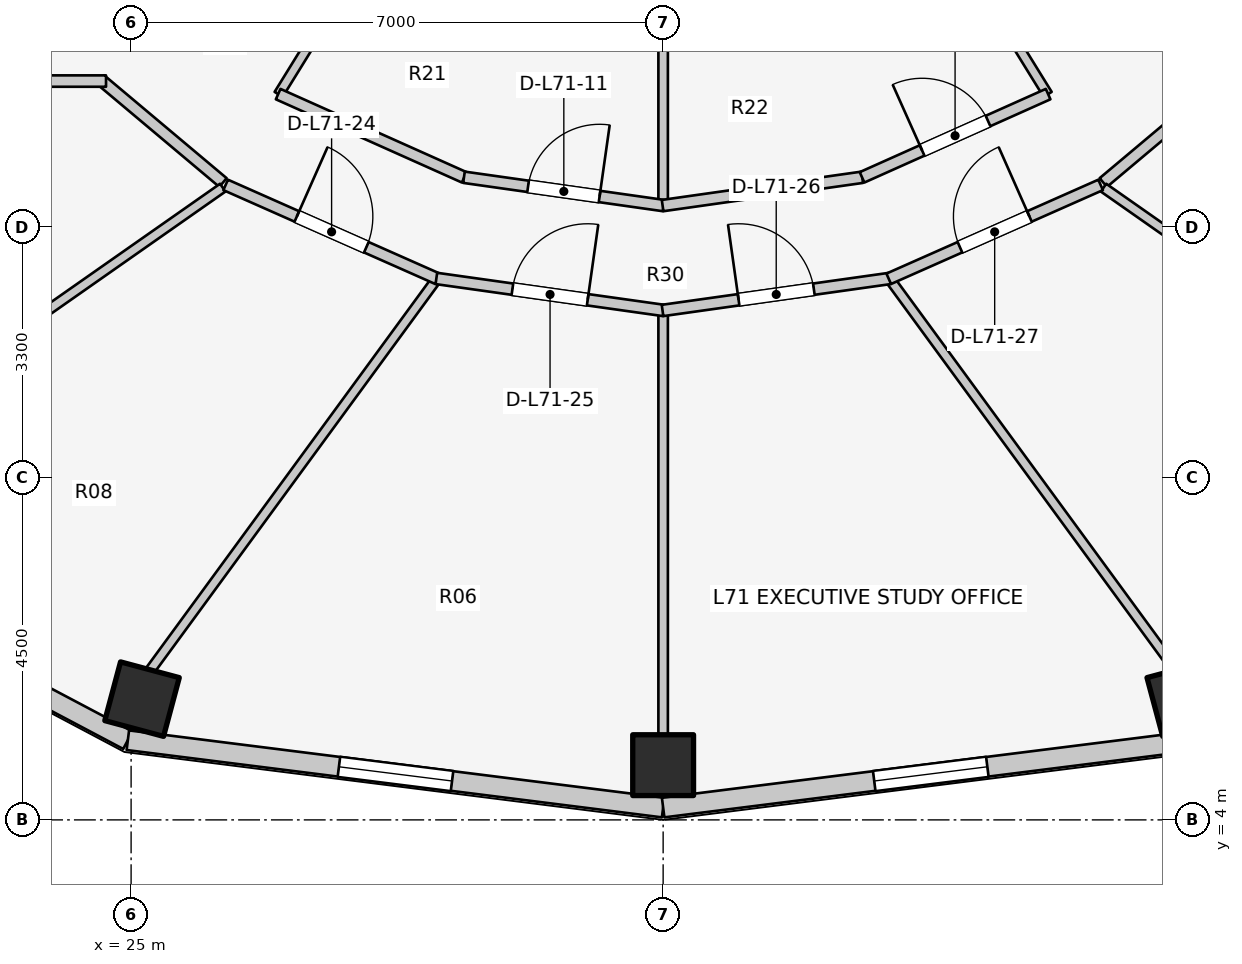
"""IFC4 building model, lengths in metres.
Left out: names, types, materials, properties, quantities, classifications, styles, units other than length and angle.
Written with IfcOpenShell. Run it as: python <this file> out.ifc"""

import sys

from ifc_helpers import new_model, si_unit, direction, frame, frame_2d, origin, origin_2d, place, context, subcontext, project, spatial, rectangle, extrude, element, fill, save


model = new_model("IFC4")
c1 = context("Model", 3, precision=1e-05, world=origin(), true_north=direction((0.0, 1.0)))
c2 = subcontext(c1, "Body", "Model", "MODEL_VIEW")
j1 = project(units=[si_unit("LENGTHUNIT", "METRE"), si_unit("PLANEANGLEUNIT", "RADIAN")], contexts=[c1])
p1 = place(None, origin())
s1 = spatial("IfcSite", under=j1, at=p1, CompositionType="ELEMENT")
p2 = place(p1, origin())
s2 = spatial("IfcBuilding", under=s1, at=p2, CompositionType="ELEMENT")
p3 = place(p2, frame((0.0, 0.0, 232.6)))
s3 = spatial("IfcBuildingStorey", under=s2, at=p3, CompositionType="ELEMENT", Elevation=232.6)
for number, where, z_axis, x_axis in (
    (1, (25.144, 5.589, 0.0), (0.0, 0.0, 1.0), (-0.259, -0.966, 0.0)),
    (2, (32.0, 4.72, 0.0), (0.0, 0.0, 1.0), (0.0, -1.0, 0.0)),
    (3, (38.856, 5.589, 0.0), (0.0, 0.0, 1.0), (0.259, -0.966, 0.0)),
):
    element("IfcColumn", number, at=place(p3, frame(where, z_axis=z_axis, x_axis=x_axis)), inside=s3, PredefinedType="COLUMN", context=c2, shape_type="SweptSolid", body=[
        extrude(rectangle(XDim=0.8, YDim=0.8, at=origin_2d()), origin(), (0.0, 0.0, 1.0), 3.1),
    ])
p4 = place(p3, frame((20.13, 7.601, 0.0), z_axis=(0.0, 0.0, 1.0), x_axis=(0.884000981341, -0.46748504253, 0.0)))
e4 = element("IfcWall", 4, at=p4, inside=s3, PredefinedType="STANDARD", context=c2, shape_type="SweptSolid", body=[
    extrude(rectangle(XDim=5.46, YDim=0.26, at=frame_2d((2.73, 0.0))), origin(), (0.0, 0.0, 1.0), 2.85),
])
p5 = place(p4, frame((1.53, 0.0, 0.75)))
e5 = element("IfcOpeningElement", 5, at=p5, cuts=e4, PredefinedType="OPENING", context=c2, shape_type="SweptSolid", body=[
    extrude(rectangle(XDim=2.4, YDim=1.7, at=frame_2d((1.2, 0.85))), frame((0.0, 0.14, 0.0), z_axis=(0.0, -1.0, 0.0), x_axis=(1.0, 0.0, 0.0)), (0.0, 0.0, 1.0), 0.28),
])
p6 = place(p3, frame((24.957, 5.048, 0.0), z_axis=(0.0, 0.0, 1.0), x_axis=(0.992180211307, -0.124813574142, 0.0)))
e6 = element("IfcWall", 6, at=p6, inside=s3, PredefinedType="STANDARD", context=c2, shape_type="SweptSolid", body=[
    extrude(rectangle(XDim=7.098, YDim=0.26, at=frame_2d((3.549, 0.0))), origin(), (0.0, 0.0, 1.0), 2.85),
])
p7 = place(p6, frame((2.799, 0.0, 0.75)))
e7 = element("IfcOpeningElement", 7, at=p7, cuts=e6, PredefinedType="OPENING", context=c2, shape_type="SweptSolid", body=[
    extrude(rectangle(XDim=1.5, YDim=1.6, at=frame_2d((0.75, 0.8))), frame((0.0, 0.14, 0.0), z_axis=(0.0, -1.0, 0.0), x_axis=(1.0, 0.0, 0.0)), (0.0, 0.0, 1.0), 0.28),
])
p8 = place(p3, frame((32.0, 4.162, 0.0), z_axis=(0.0, 0.0, 1.0), x_axis=(0.992180211307, 0.124813574142, 0.0)))
e8 = element("IfcWall", 8, at=p8, inside=s3, PredefinedType="STANDARD", context=c2, shape_type="SweptSolid", body=[
    extrude(rectangle(XDim=7.098, YDim=0.26, at=frame_2d((3.549, 0.0))), origin(), (0.0, 0.0, 1.0), 2.85),
])
p9 = place(p8, frame((2.799, 0.0, 0.75)))
e9 = element("IfcOpeningElement", 9, at=p9, cuts=e8, PredefinedType="OPENING", context=c2, shape_type="SweptSolid", body=[
    extrude(rectangle(XDim=1.5, YDim=1.6, at=frame_2d((0.75, 0.8))), frame((0.0, 0.14, 0.0), z_axis=(0.0, -1.0, 0.0), x_axis=(1.0, 0.0, 0.0)), (0.0, 0.0, 1.0), 0.28),
])
p10 = place(p3, frame((28.45, 15.985, 0.0), z_axis=(0.0, 0.0, 1.0), x_axis=(-0.52592395012, -0.850531597702, 0.0)))
e10 = element("IfcWall", 10, at=p10, inside=s3, PredefinedType="PARTITIONING", context=c2, shape_type="SweptSolid", body=[
    extrude(rectangle(XDim=2.869, YDim=0.125, at=frame_2d((1.435, 0.0))), origin(), (0.0, 0.0, 1.0), 2.376),
])
p11 = place(p3, frame((32.0, 14.9, 0.0), z_axis=(0.0, 0.0, 1.0), x_axis=(0.0, -1.0, 0.0)))
e11 = element("IfcWall", 11, at=p11, inside=s3, PredefinedType="PARTITIONING", context=c2, shape_type="SweptSolid", body=[
    extrude(rectangle(XDim=2.818, YDim=0.125, at=frame_2d((1.409, 0.0))), origin(), (0.0, 0.0, 1.0), 2.376),
])
p12 = place(p3, frame((35.55, 15.985, 0.0), z_axis=(0.0, 0.0, 1.0), x_axis=(0.52592395012, -0.850531597702, 0.0)))
e12 = element("IfcWall", 12, at=p12, inside=s3, PredefinedType="PARTITIONING", context=c2, shape_type="SweptSolid", body=[
    extrude(rectangle(XDim=2.869, YDim=0.125, at=frame_2d((1.435, 0.0))), origin(), (0.0, 0.0, 1.0), 2.376),
])
p13 = place(p3, frame((26.935, 13.549, 0.0), z_axis=(0.0, 0.0, 1.0), x_axis=(0.912859324183, -0.408274239027, 0.0)))
e13 = element("IfcWall", 13, at=p13, inside=s3, PredefinedType="PARTITIONING", context=c2, shape_type="SweptSolid", body=[
    extrude(rectangle(XDim=2.682, YDim=0.15, at=frame_2d((1.341, 0.0))), origin(), (0.0, 0.0, 1.0), 2.376),
])
p14 = place(p3, frame((29.38, 12.455, 0.0), z_axis=(0.0, 0.0, 1.0), x_axis=(0.990096156252, -0.140390887794, 0.0)))
e14 = element("IfcWall", 14, at=p14, inside=s3, PredefinedType="PARTITIONING", context=c2, shape_type="SweptSolid", body=[
    extrude(rectangle(XDim=2.654, YDim=0.15, at=frame_2d((1.327, 0.0))), origin(), (0.0, 0.0, 1.0), 2.376),
])
p15 = place(p14, frame((0.852, 0.0, 0.0)))
e15 = element("IfcOpeningElement", 15, at=p15, cuts=e14, PredefinedType="OPENING", context=c2, shape_type="SweptSolid", body=[
    extrude(rectangle(XDim=0.95, YDim=2.1, at=frame_2d((0.475, 1.05))), frame((0.0, 0.085, 0.0), z_axis=(0.0, -1.0, 0.0), x_axis=(1.0, 0.0, 0.0)), (0.0, 0.0, 1.0), 0.17),
])
p16 = place(p3, frame((31.993, 12.082, 0.0), z_axis=(0.0, 0.0, 1.0), x_axis=(0.990096156252, 0.140390887794, 0.0)))
e16 = element("IfcWall", 16, at=p16, inside=s3, PredefinedType="PARTITIONING", context=c2, shape_type="SweptSolid", body=[
    extrude(rectangle(XDim=2.654, YDim=0.15, at=frame_2d((1.327, 0.0))), origin(), (0.0, 0.0, 1.0), 2.376),
])
p17 = place(p3, frame((34.617, 12.454, 0.0), z_axis=(0.0, 0.0, 1.0), x_axis=(0.912859324183, 0.408274239027, 0.0)))
e17 = element("IfcWall", 17, at=p17, inside=s3, PredefinedType="PARTITIONING", context=c2, shape_type="SweptSolid", body=[
    extrude(rectangle(XDim=2.682, YDim=0.15, at=frame_2d((1.341, 0.0))), origin(), (0.0, 0.0, 1.0), 2.376),
])
p18 = place(p17, frame((0.866, 0.0, 0.0)))
e18 = element("IfcOpeningElement", 18, at=p18, cuts=e17, PredefinedType="OPENING", context=c2, shape_type="SweptSolid", body=[
    extrude(rectangle(XDim=0.95, YDim=2.1, at=frame_2d((0.475, 1.05))), frame((0.0, 0.085, 0.0), z_axis=(0.0, -1.0, 0.0), x_axis=(1.0, 0.0, 0.0)), (0.0, 0.0, 1.0), 0.17),
])
p19 = place(p3, frame((26.209, 12.385, 0.0), z_axis=(0.0, 0.0, 1.0), x_axis=(-0.765677451641, 0.643224719711, 0.0)))
e19 = element("IfcWall", 19, at=p19, inside=s3, PredefinedType="PARTITIONING", context=c2, shape_type="SweptSolid", body=[
    extrude(rectangle(XDim=2.105, YDim=0.15, at=frame_2d((1.053, 0.0))), origin(), (0.0, 0.0, 1.0), 2.376),
])
p20 = place(p3, frame((17.15, 13.72, 0.0), z_axis=(0.0, 0.0, 1.0), x_axis=(1.0, 0.0, 0.0)))
e20 = element("IfcWall", 20, at=p20, inside=s3, PredefinedType="PARTITIONING", context=c2, shape_type="SweptSolid", body=[
    extrude(rectangle(XDim=7.52, YDim=0.15, at=frame_2d((3.76, 0.0))), origin(), (0.0, 0.0, 1.0), 2.376),
])
p21 = place(p20, frame((1.3, 0.0, 0.0)))
e21 = element("IfcOpeningElement", 21, at=p21, cuts=e20, PredefinedType="OPENING", context=c2, shape_type="SweptSolid", body=[
    extrude(rectangle(XDim=0.9, YDim=2.1, at=frame_2d((0.45, 1.05))), frame((0.0, 0.085, 0.0), z_axis=(0.0, -1.0, 0.0), x_axis=(1.0, 0.0, 0.0)), (0.0, 0.0, 1.0), 0.17),
])
p22 = place(p3, frame((37.791, 12.385, 0.0), z_axis=(0.0, 0.0, 1.0), x_axis=(0.765677451641, 0.643224719711, 0.0)))
e22 = element("IfcWall", 22, at=p22, inside=s3, PredefinedType="PARTITIONING", context=c2, shape_type="SweptSolid", body=[
    extrude(rectangle(XDim=2.105, YDim=0.15, at=frame_2d((1.053, 0.0))), origin(), (0.0, 0.0, 1.0), 2.376),
])
p23 = place(p3, frame((26.206, 12.318, 0.0), z_axis=(0.0, 0.0, 1.0), x_axis=(-0.819017716307, -0.573768228796, 0.0)))
e23 = element("IfcWall", 23, at=p23, inside=s3, PredefinedType="PARTITIONING", context=c2, shape_type="SweptSolid", body=[
    extrude(rectangle(XDim=6.802, YDim=0.125, at=frame_2d((3.401, 0.0))), origin(), (0.0, 0.0, 1.0), 2.376),
])
p24 = place(p3, frame((28.992, 11.077, 0.0), z_axis=(0.0, 0.0, 1.0), x_axis=(-0.590771495169, -0.806838918555, 0.0)))
e24 = element("IfcWall", 24, at=p24, inside=s3, PredefinedType="PARTITIONING", context=c2, shape_type="SweptSolid", body=[
    extrude(rectangle(XDim=6.347, YDim=0.125, at=frame_2d((3.173, 0.0))), origin(), (0.0, 0.0, 1.0), 2.376),
])
p25 = place(p3, frame((32.0, 10.647, 0.0), z_axis=(0.0, 0.0, 1.0), x_axis=(0.0, -1.0, 0.0)))
e25 = element("IfcWall", 25, at=p25, inside=s3, PredefinedType="PARTITIONING", context=c2, shape_type="SweptSolid", body=[
    extrude(rectangle(XDim=5.547, YDim=0.125, at=frame_2d((2.773, 0.0))), origin(), (0.0, 0.0, 1.0), 2.376),
])
p26 = place(p3, frame((35.008, 11.077, 0.0), z_axis=(0.0, 0.0, 1.0), x_axis=(0.590771495169, -0.806838918555, 0.0)))
e26 = element("IfcWall", 26, at=p26, inside=s3, PredefinedType="PARTITIONING", context=c2, shape_type="SweptSolid", body=[
    extrude(rectangle(XDim=6.347, YDim=0.125, at=frame_2d((3.173, 0.0))), origin(), (0.0, 0.0, 1.0), 2.376),
])
p27 = place(p3, frame((37.794, 12.318, 0.0), z_axis=(0.0, 0.0, 1.0), x_axis=(0.819017716307, -0.573768228796, 0.0)))
e27 = element("IfcWall", 27, at=p27, inside=s3, PredefinedType="PARTITIONING", context=c2, shape_type="SweptSolid", body=[
    extrude(rectangle(XDim=6.802, YDim=0.125, at=frame_2d((3.401, 0.0))), origin(), (0.0, 0.0, 1.0), 2.376),
])
p28 = place(p3, frame((26.244, 12.354, 0.0), z_axis=(0.0, 0.0, 1.0), x_axis=(0.914302802833, -0.405031337963, 0.0)))
e28 = element("IfcWall", 28, at=p28, inside=s3, PredefinedType="PARTITIONING", context=c2, shape_type="SweptSolid", body=[
    extrude(rectangle(XDim=3.049, YDim=0.15, at=frame_2d((1.525, 0.0))), origin(), (0.0, 0.0, 1.0), 2.376),
])
p29 = place(p28, frame((1.025, 0.0, 0.0)))
e29 = element("IfcOpeningElement", 29, at=p29, cuts=e28, PredefinedType="OPENING", context=c2, shape_type="SweptSolid", body=[
    extrude(rectangle(XDim=1.0, YDim=2.1, at=frame_2d((0.5, 1.05))), frame((0.0, 0.085, 0.0), z_axis=(0.0, -1.0, 0.0), x_axis=(1.0, 0.0, 0.0)), (0.0, 0.0, 1.0), 0.17),
])
p30 = place(p3, frame((29.016, 11.123, 0.0), z_axis=(0.0, 0.0, 1.0), x_axis=(0.990225561979, -0.139475217886, 0.0)))
e30 = element("IfcWall", 30, at=p30, inside=s3, PredefinedType="PARTITIONING", context=c2, shape_type="SweptSolid", body=[
    extrude(rectangle(XDim=3.021, YDim=0.15, at=frame_2d((1.511, 0.0))), origin(), (0.0, 0.0, 1.0), 2.376),
])
p31 = place(p30, frame((1.01, 0.0, 0.0)))
e31 = element("IfcOpeningElement", 31, at=p31, cuts=e30, PredefinedType="OPENING", context=c2, shape_type="SweptSolid", body=[
    extrude(rectangle(XDim=1.0, YDim=2.1, at=frame_2d((0.5, 1.05))), frame((0.0, 0.085, 0.0), z_axis=(0.0, -1.0, 0.0), x_axis=(1.0, 0.0, 0.0)), (0.0, 0.0, 1.0), 0.17),
])
p32 = place(p3, frame((31.992, 10.702, 0.0), z_axis=(0.0, 0.0, 1.0), x_axis=(0.990225561979, 0.139475217886, 0.0)))
e32 = element("IfcWall", 32, at=p32, inside=s3, PredefinedType="PARTITIONING", context=c2, shape_type="SweptSolid", body=[
    extrude(rectangle(XDim=3.021, YDim=0.15, at=frame_2d((1.511, 0.0))), origin(), (0.0, 0.0, 1.0), 2.376),
])
p33 = place(p32, frame((1.01, 0.0, 0.0)))
e33 = element("IfcOpeningElement", 33, at=p33, cuts=e32, PredefinedType="OPENING", context=c2, shape_type="SweptSolid", body=[
    extrude(rectangle(XDim=1.0, YDim=2.1, at=frame_2d((0.5, 1.05))), frame((0.0, 0.085, 0.0), z_axis=(0.0, -1.0, 0.0), x_axis=(1.0, 0.0, 0.0)), (0.0, 0.0, 1.0), 0.17),
])
p34 = place(p3, frame((34.968, 11.119, 0.0), z_axis=(0.0, 0.0, 1.0), x_axis=(0.914302802833, 0.405031337963, 0.0)))
e34 = element("IfcWall", 34, at=p34, inside=s3, PredefinedType="PARTITIONING", context=c2, shape_type="SweptSolid", body=[
    extrude(rectangle(XDim=3.049, YDim=0.15, at=frame_2d((1.525, 0.0))), origin(), (0.0, 0.0, 1.0), 2.376),
])
p35 = place(p34, frame((1.025, 0.0, 0.0)))
e35 = element("IfcOpeningElement", 35, at=p35, cuts=e34, PredefinedType="OPENING", context=c2, shape_type="SweptSolid", body=[
    extrude(rectangle(XDim=1.0, YDim=2.1, at=frame_2d((0.5, 1.05))), frame((0.0, 0.085, 0.0), z_axis=(0.0, -1.0, 0.0), x_axis=(1.0, 0.0, 0.0)), (0.0, 0.0, 1.0), 0.17),
])
p36 = place(p7, origin())
e36 = element("IfcWindow", 36, at=p36, inside=s3, PartitioningType="SINGLE_PANEL", PredefinedType="WINDOW", context=c2, shape_type="SweptSolid", body=[
    extrude(rectangle(XDim=1.5, YDim=1.6, at=frame_2d((0.75, 0.8))), frame((0.0, 0.03, 0.0), z_axis=(0.0, -1.0, 0.0), x_axis=(1.0, 0.0, 0.0)), (0.0, 0.0, 1.0), 0.06),
])
fill(e7, e36)
p37 = place(p9, origin())
e37 = element("IfcWindow", 37, at=p37, inside=s3, PartitioningType="SINGLE_PANEL", PredefinedType="WINDOW", context=c2, shape_type="SweptSolid", body=[
    extrude(rectangle(XDim=1.5, YDim=1.6, at=frame_2d((0.75, 0.8))), frame((0.0, 0.03, 0.0), z_axis=(0.0, -1.0, 0.0), x_axis=(1.0, 0.0, 0.0)), (0.0, 0.0, 1.0), 0.06),
])
fill(e9, e37)
p38 = place(p15, origin())
e38 = element("IfcDoor", 38, at=p38, inside=s3, OperationType="SINGLE_SWING_RIGHT", PredefinedType="DOOR", context=c2, shape_type="SweptSolid", body=[
    extrude(rectangle(XDim=0.95, YDim=2.1, at=frame_2d((0.475, 1.05))), frame((0.0, 0.025, 0.0), z_axis=(0.0, -1.0, 0.0), x_axis=(1.0, 0.0, 0.0)), (0.0, 0.0, 1.0), 0.05),
])
fill(e15, e38)
p39 = place(p18, origin())
e39 = element("IfcDoor", 39, at=p39, inside=s3, OperationType="SINGLE_SWING_LEFT", PredefinedType="DOOR", context=c2, shape_type="SweptSolid", body=[
    extrude(rectangle(XDim=0.95, YDim=2.1, at=frame_2d((0.475, 1.05))), frame((0.0, 0.025, 0.0), z_axis=(0.0, -1.0, 0.0), x_axis=(1.0, 0.0, 0.0)), (0.0, 0.0, 1.0), 0.05),
])
fill(e18, e39)
p40 = place(p29, origin())
e40 = element("IfcDoor", 40, at=p40, inside=s3, OperationType="SINGLE_SWING_LEFT", PredefinedType="DOOR", context=c2, shape_type="SweptSolid", body=[
    extrude(rectangle(XDim=1.0, YDim=2.1, at=frame_2d((0.5, 1.05))), frame((0.0, 0.025, 0.0), z_axis=(0.0, -1.0, 0.0), x_axis=(1.0, 0.0, 0.0)), (0.0, 0.0, 1.0), 0.05),
])
fill(e29, e40)
p41 = place(p31, origin())
e41 = element("IfcDoor", 41, at=p41, inside=s3, OperationType="SINGLE_SWING_RIGHT", PredefinedType="DOOR", context=c2, shape_type="SweptSolid", body=[
    extrude(rectangle(XDim=1.0, YDim=2.1, at=frame_2d((0.5, 1.05))), frame((0.0, 0.025, 0.0), z_axis=(0.0, -1.0, 0.0), x_axis=(1.0, 0.0, 0.0)), (0.0, 0.0, 1.0), 0.05),
])
fill(e31, e41)
p42 = place(p33, origin())
e42 = element("IfcDoor", 42, at=p42, inside=s3, OperationType="SINGLE_SWING_LEFT", PredefinedType="DOOR", context=c2, shape_type="SweptSolid", body=[
    extrude(rectangle(XDim=1.0, YDim=2.1, at=frame_2d((0.5, 1.05))), frame((0.0, 0.025, 0.0), z_axis=(0.0, -1.0, 0.0), x_axis=(1.0, 0.0, 0.0)), (0.0, 0.0, 1.0), 0.05),
])
fill(e33, e42)
p43 = place(p35, origin())
e43 = element("IfcDoor", 43, at=p43, inside=s3, OperationType="SINGLE_SWING_RIGHT", PredefinedType="DOOR", context=c2, shape_type="SweptSolid", body=[
    extrude(rectangle(XDim=1.0, YDim=2.1, at=frame_2d((0.5, 1.05))), frame((0.0, 0.025, 0.0), z_axis=(0.0, -1.0, 0.0), x_axis=(1.0, 0.0, 0.0)), (0.0, 0.0, 1.0), 0.05),
])
fill(e35, e43)
save(model, sys.argv[1])
